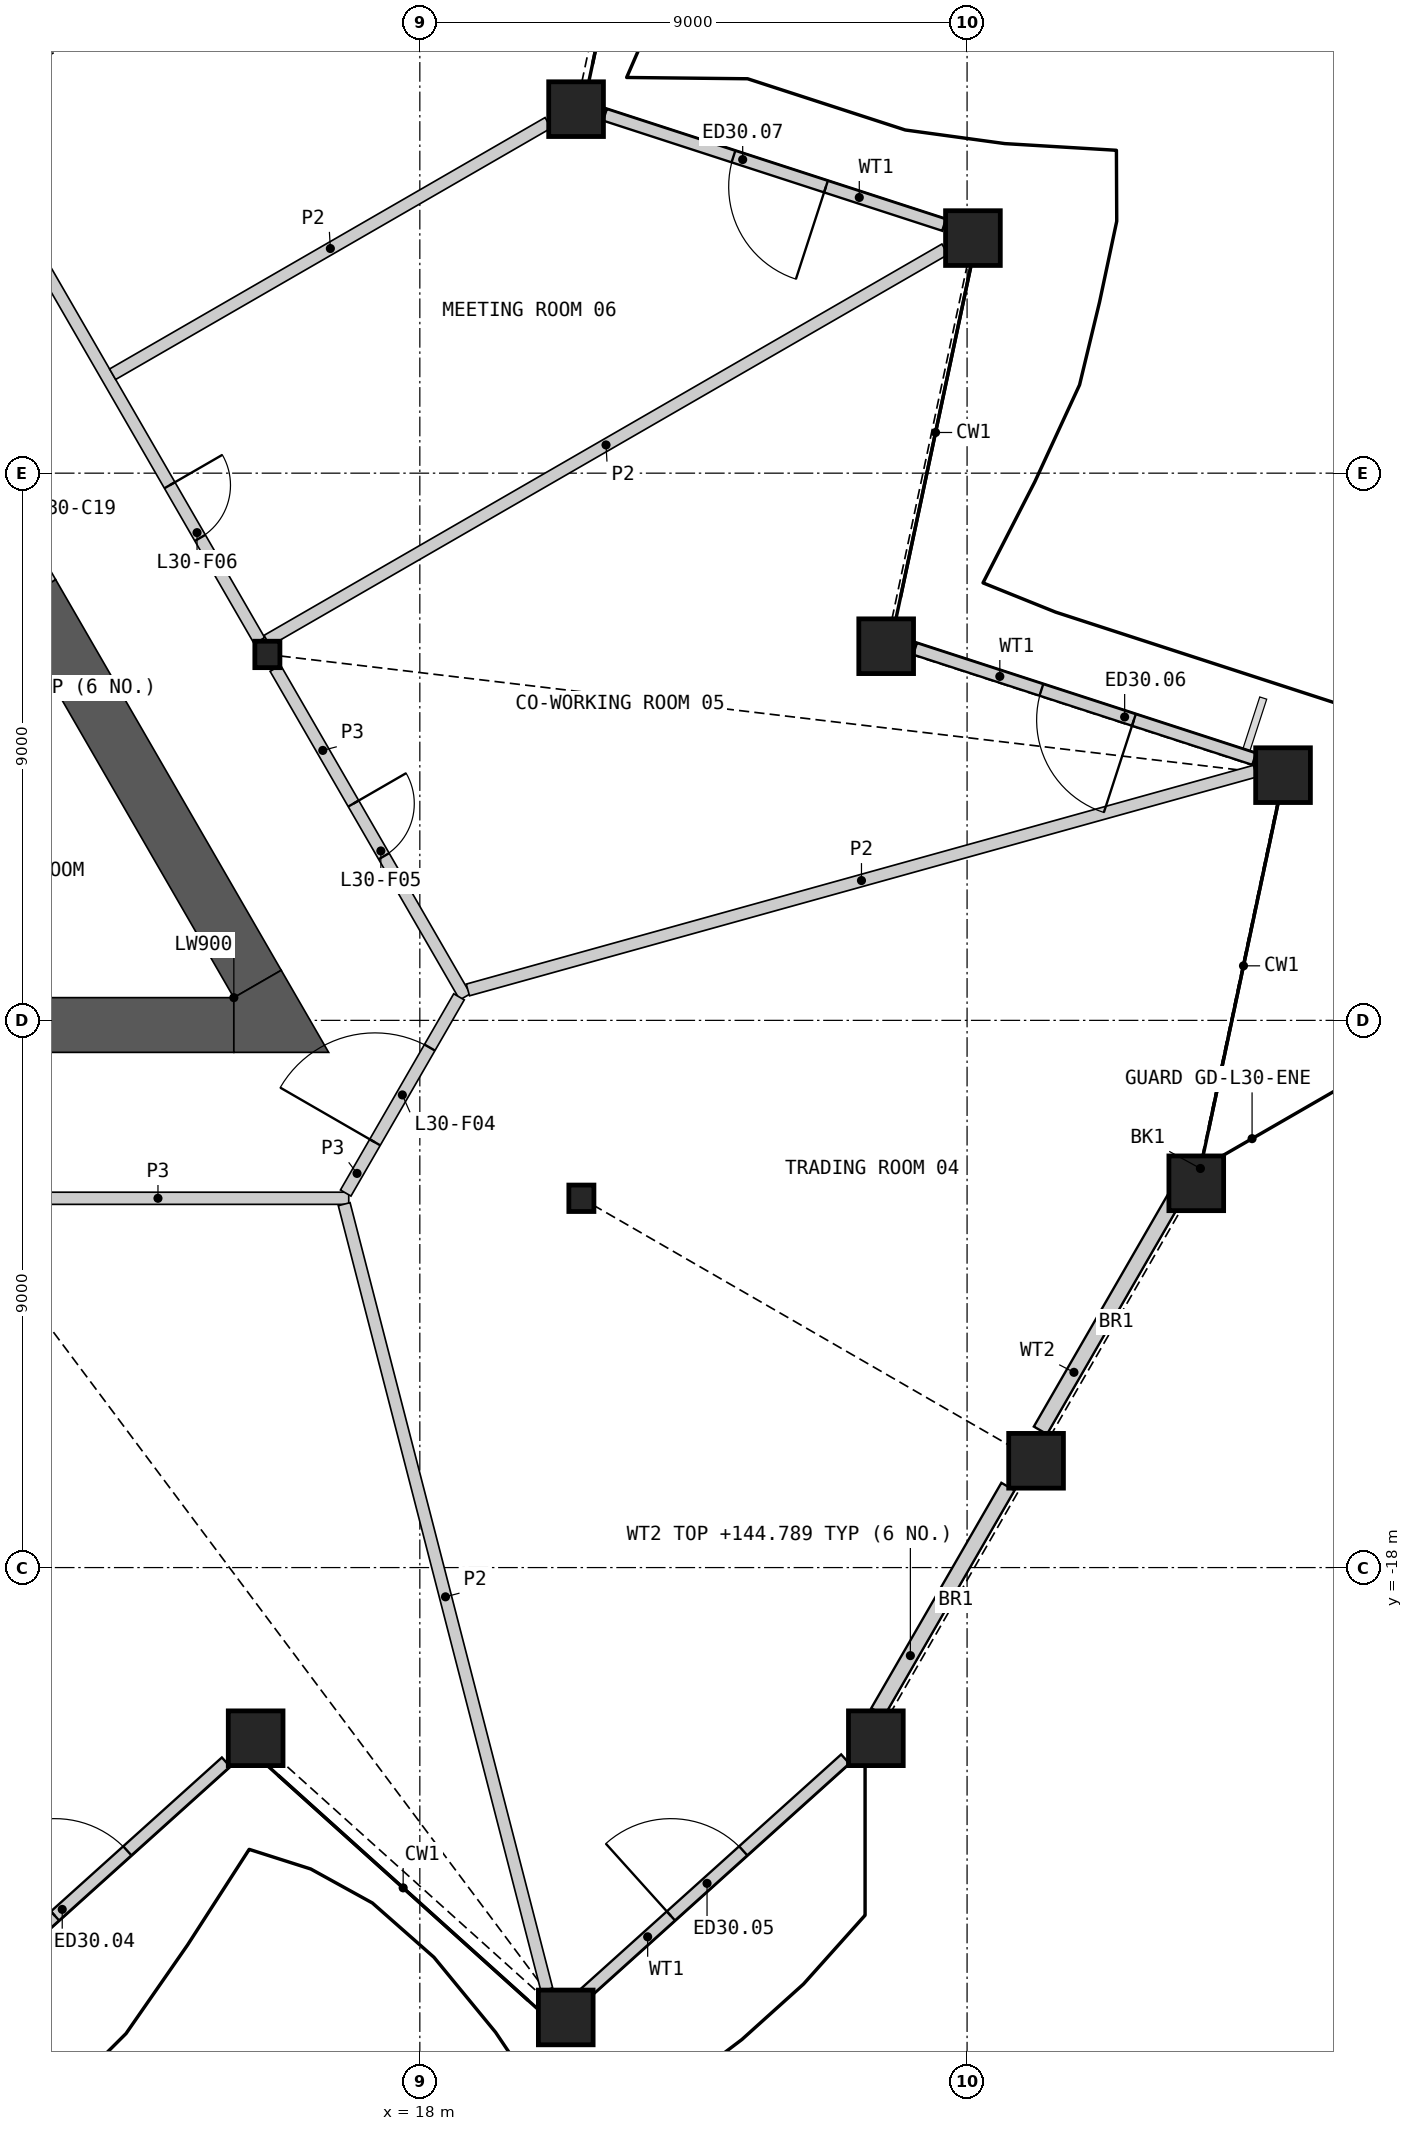
"""IFC4 building model, lengths in metres.
Left out: names, types, materials, properties, quantities, classifications, styles, units other than length and angle.
Written with IfcOpenShell. Run it as: python <this file> out.ifc"""

import sys

from ifc_helpers import new_model, si_unit, direction, frame, frame_2d, origin, origin_2d, place, context, subcontext, project, spatial, polyline, rectangle, hollow_rectangle, i_section, outline, extrude, element, fill, save


model = new_model("IFC4")
c1 = context("Model", 3, precision=1e-05, world=origin(), true_north=direction((0.0, 1.0)))
c2 = subcontext(c1, "Body", "Model", "MODEL_VIEW")
j1 = project(units=[si_unit("LENGTHUNIT", "METRE"), si_unit("PLANEANGLEUNIT", "RADIAN")], contexts=[c1])
p1 = place(None, origin())
s1 = spatial("IfcSite", under=j1, at=p1, CompositionType="ELEMENT")
p2 = place(p1, origin())
s2 = spatial("IfcBuilding", under=s1, at=p2, CompositionType="ELEMENT")
p3 = place(p2, frame((0.0, 0.0, 141.6)))
s3 = spatial("IfcBuildingStorey", under=s2, at=p3, CompositionType="ELEMENT", Elevation=141.6)
for number, where, z_axis, x_axis in (
    (1, (15.3, -20.807, 0.0), (0.0, 0.0, 1.0), (1.0, 0.0, 0.0)),
    (2, (20.4, -25.399, 0.0), (0.0, 0.0, 1.0), (1.0, 0.0, 0.0)),
    (3, (25.5, -20.807, 0.0), (0.0, 0.0, 1.0), (1.0, 0.0, 0.0)),
    (4, (28.135, -16.243, 0.0), (0.0, 0.0, 1.0), (1.0, 0.0, 0.0)),
    (5, (30.769, -11.68, 0.0), (0.0, 0.0, 1.0), (1.0, 0.0, 0.0)),
    (6, (32.196, -4.967, 0.0), (0.0, 0.0, 1.0), (1.0, 0.0, 0.0)),
    (7, (25.669, -2.846, 0.0), (0.0, 0.0, 1.0), (1.0, 0.0, 0.0)),
    (8, (27.096, 3.866, 0.0), (0.0, 0.0, 1.0), (1.0, 0.0, 0.0)),
    (9, (20.57, 5.987, 0.0), (0.0, 0.0, 1.0), (1.0, 0.0, 0.0)),
):
    element("IfcColumn", number, at=place(p3, frame(where, z_axis=z_axis, x_axis=x_axis)), inside=s3, PredefinedType="COLUMN", context=c2, shape_type="SweptSolid", body=[
        extrude(hollow_rectangle(XDim=0.9, YDim=0.9, WallThickness=0.06, at=origin_2d()), origin(), (0.0, 0.0, 1.0), 4.2),
    ])
for number, where, z_axis, x_axis in (
    (10, (20.657, -11.926, 0.0), (0.0, 0.0, 1.0), (1.0, 0.0, 0.0)),
    (11, (15.493, -2.982, 0.0), (0.0, 0.0, 1.0), (1.0, 0.0, 0.0)),
):
    element("IfcColumn", number, at=place(p3, frame(where, z_axis=z_axis, x_axis=x_axis)), inside=s3, PredefinedType="COLUMN", context=c2, shape_type="SweptSolid", body=[
        extrude(i_section(OverallWidth=0.412, OverallDepth=0.435, WebThickness=0.036, FlangeThickness=0.057, at=origin_2d()), origin(), (0.0, 0.0, 1.0), 4.2),
    ])
p4 = place(p3, frame((10.535, -25.048, 0.0), z_axis=(0.0, 0.0, 1.0), x_axis=(0.74315279225, 0.669121758256, 0.0)))
e12 = element("IfcWall", 12, at=p4, inside=s3, PredefinedType="SOLIDWALL", context=c2, shape_type="SweptSolid", body=[
    extrude(rectangle(XDim=5.755, YDim=0.2, at=frame_2d((2.877, 0.0))), origin(), (0.0, 0.0, 1.0), 3.189),
])
p5 = place(p4, frame((1.971, 0.0, 0.0)))
e13 = element("IfcOpeningElement", 13, at=p5, cuts=e12, PredefinedType="OPENING", context=c2, shape_type="SweptSolid", body=[
    extrude(rectangle(XDim=1.6, YDim=2.4, at=frame_2d((0.8, 1.2))), frame((0.0, 0.11, 0.0), z_axis=(0.0, -1.0, 0.0), x_axis=(1.0, 0.0, 0.0)), (0.0, 0.0, 1.0), 0.22),
])
p6 = place(p3, frame((20.664, -25.048, 0.0), z_axis=(0.0, 0.0, 1.0), x_axis=(0.743137948431, 0.669138244014, 0.0)))
e14 = element("IfcWall", 14, at=p6, inside=s3, PredefinedType="SOLIDWALL", context=c2, shape_type="SweptSolid", body=[
    extrude(rectangle(XDim=5.83, YDim=0.2, at=frame_2d((2.915, 0.0))), origin(), (0.0, 0.0, 1.0), 3.189),
])
p7 = place(p6, frame((1.971, 0.0, 0.0)))
e15 = element("IfcOpeningElement", 15, at=p7, cuts=e14, PredefinedType="OPENING", context=c2, shape_type="SweptSolid", body=[
    extrude(rectangle(XDim=1.6, YDim=2.4, at=frame_2d((0.8, 1.2))), frame((0.0, 0.11, 0.0), z_axis=(0.0, -1.0, 0.0), x_axis=(1.0, 0.0, 0.0)), (0.0, 0.0, 1.0), 0.22),
])
p8 = place(p3, frame((25.532, -20.375, 0.0), z_axis=(0.0, 0.0, 1.0), x_axis=(0.500010506321, 0.866019337872, 0.0)))
e16 = element("IfcWall", 16, at=p8, inside=s3, PredefinedType="SOLIDWALL", context=c2, shape_type="SweptSolid", body=[
    extrude(rectangle(XDim=4.28, YDim=0.25, at=frame_2d((2.14, 0.0))), origin(), (0.0, 0.0, 1.0), 3.189),
])
p9 = place(p3, frame((28.206, -15.743, 0.0), z_axis=(0.0, 0.0, 1.0), x_axis=(0.499979643272, 0.866037156428, 0.0)))
e17 = element("IfcWall", 17, at=p9, inside=s3, PredefinedType="SOLIDWALL", context=c2, shape_type="SweptSolid", body=[
    extrude(rectangle(XDim=4.41, YDim=0.25, at=frame_2d((2.205, 0.0))), origin(), (0.0, 0.0, 1.0), 3.189),
])
p10 = place(p3, frame((31.721, -4.702, 0.0), z_axis=(0.0, 0.0, 1.0), x_axis=(-0.951053952554, 0.309024884649, 0.0)))
e18 = element("IfcWall", 18, at=p10, inside=s3, PredefinedType="SOLIDWALL", context=c2, shape_type="SweptSolid", body=[
    extrude(rectangle(XDim=5.865, YDim=0.2, at=frame_2d((2.932, 0.0))), origin(), (0.0, 0.0, 1.0), 3.189),
])
p11 = place(p10, frame((2.08, 0.0, 0.0)))
e19 = element("IfcOpeningElement", 19, at=p11, cuts=e18, PredefinedType="OPENING", context=c2, shape_type="SweptSolid", body=[
    extrude(rectangle(XDim=1.6, YDim=2.4, at=frame_2d((0.8, 1.2))), frame((0.0, 0.11, 0.0), z_axis=(0.0, -1.0, 0.0), x_axis=(1.0, 0.0, 0.0)), (0.0, 0.0, 1.0), 0.22),
])
p12 = place(p3, frame((26.622, 4.082, 0.0), z_axis=(0.0, 0.0, 1.0), x_axis=(-0.951053952554, 0.309024884649, 0.0)))
e20 = element("IfcWall", 20, at=p12, inside=s3, PredefinedType="SOLIDWALL", context=c2, shape_type="SweptSolid", body=[
    extrude(rectangle(XDim=5.865, YDim=0.2, at=frame_2d((2.932, 0.0))), origin(), (0.0, 0.0, 1.0), 3.189),
])
p13 = place(p12, frame((2.042, 0.0, 0.0)))
e21 = element("IfcOpeningElement", 21, at=p13, cuts=e20, PredefinedType="OPENING", context=c2, shape_type="SweptSolid", body=[
    extrude(rectangle(XDim=1.6, YDim=2.4, at=frame_2d((0.8, 1.2))), frame((0.0, 0.11, 0.0), z_axis=(0.0, -1.0, 0.0), x_axis=(1.0, 0.0, 0.0)), (0.0, 0.0, 1.0), 0.22),
])
p14 = place(p3, frame((2.488, -9.076, 0.0), z_axis=(0.0, 0.0, 1.0), x_axis=(1.0, 0.0, 0.0)))
e22 = element("IfcWall", 22, at=p14, inside=s3, PredefinedType="SHEAR", context=c2, shape_type="SweptSolid", body=[
    extrude(rectangle(XDim=12.454, YDim=0.9, at=frame_2d((6.227, 0.0))), origin(), (0.0, 0.0, 1.0), 3.8),
])
p15 = place(p3, frame((15.331, -8.401, 0.0), z_axis=(0.0, 0.0, 1.0), x_axis=(-0.499985413531, 0.866033825122, 0.0)))
e23 = element("IfcWall", 23, at=p15, inside=s3, PredefinedType="SHEAR", context=c2, shape_type="SweptSolid", body=[
    extrude(rectangle(XDim=7.421, YDim=0.9, at=frame_2d((3.71, 0.0))), origin(), (0.0, 0.0, 1.0), 3.8),
])
p16 = place(p3, origin())
e24 = element("IfcWall", 24, at=p16, inside=s3, PredefinedType="SHEAR", context=c2, shape_type="SweptSolid", body=[
    extrude(outline(polyline([(14.941, -8.626), (15.721, -8.176), (16.5, -9.526), (14.941, -9.526), (14.941, -8.626)])), origin(), (0.0, 0.0, 1.0), 3.8),
])
p17 = place(p3, frame((11.621, -1.975, 0.0), z_axis=(0.0, 0.0, 1.0), x_axis=(-0.50002983664, 0.866008176907, 0.0)))
e25 = element("IfcWall", 25, at=p17, inside=s3, PredefinedType="SHEAR", context=c2, shape_type="SweptSolid", body=[
    extrude(rectangle(XDim=2.2, YDim=0.9, at=frame_2d((1.1, 0.0))), origin(), (0.0, 0.0, 1.0), 3.8),
])
p18 = place(p17, frame((0.6, 0.0, 0.0)))
e26 = element("IfcOpeningElement", 26, at=p18, cuts=e25, PredefinedType="OPENING", context=c2, shape_type="SweptSolid", body=[
    extrude(rectangle(XDim=1.0, YDim=2.1, at=frame_2d((0.5, 1.05))), frame((0.0, 0.46, 0.0), z_axis=(0.0, -1.0, 0.0), x_axis=(1.0, 0.0, 0.0)), (0.0, 0.0, 1.0), 0.92),
])
p19 = place(p3, frame((10.46, 5.736, 0.0), z_axis=(0.0, 0.0, 1.0), x_axis=(0.500004141693, -0.866023012564, 0.0)))
e27 = element("IfcWall", 27, at=p19, inside=s3, PredefinedType="PARTITIONING", context=c2, shape_type="SweptSolid", body=[
    extrude(rectangle(XDim=9.803, YDim=0.2, at=frame_2d((4.902, 0.0))), origin(), (0.0, 0.0, 1.0), 3.8),
])
p20 = place(p19, frame((6.853, 0.0, 0.0)))
e28 = element("IfcOpeningElement", 28, at=p20, cuts=e27, PredefinedType="OPENING", context=c2, shape_type="SweptSolid", body=[
    extrude(rectangle(XDim=1.0, YDim=2.1, at=frame_2d((0.5, 1.05))), frame((0.0, 0.11, 0.0), z_axis=(0.0, -1.0, 0.0), x_axis=(1.0, 0.0, 0.0)), (0.0, 0.0, 1.0), 0.22),
])
p21 = place(p3, frame((10.556, -11.926, 0.0), z_axis=(0.0, 0.0, 1.0), x_axis=(1.0, 0.0, 0.0)))
e29 = element("IfcWall", 29, at=p21, inside=s3, PredefinedType="PARTITIONING", context=c2, shape_type="SweptSolid", body=[
    extrude(rectangle(XDim=6.275, YDim=0.2, at=frame_2d((3.137, 0.0))), origin(), (0.0, 0.0, 1.0), 3.8),
])
p22 = place(p3, frame((15.624, -3.209, 0.0), z_axis=(0.0, 0.0, 1.0), x_axis=(0.499997920671, -0.866026604282, 0.0)))
e30 = element("IfcWall", 30, at=p22, inside=s3, PredefinedType="PARTITIONING", context=c2, shape_type="SweptSolid", body=[
    extrude(rectangle(XDim=6.24, YDim=0.2, at=frame_2d((3.12, 0.0))), origin(), (0.0, 0.0, 1.0), 3.8),
])
p23 = place(p22, frame((2.57, 0.0, 0.0)))
e31 = element("IfcOpeningElement", 31, at=p23, cuts=e30, PredefinedType="OPENING", context=c2, shape_type="SweptSolid", body=[
    extrude(rectangle(XDim=1.0, YDim=2.1, at=frame_2d((0.5, 1.05))), frame((0.0, 0.11, 0.0), z_axis=(0.0, -1.0, 0.0), x_axis=(1.0, 0.0, 0.0)), (0.0, 0.0, 1.0), 0.22),
])
p24 = place(p3, frame((16.781, -11.84, 0.0), z_axis=(0.0, 0.0, 1.0), x_axis=(0.499958791762, 0.866049194065, 0.0)))
e32 = element("IfcWall", 32, at=p24, inside=s3, PredefinedType="PARTITIONING", context=c2, shape_type="SweptSolid", body=[
    extrude(rectangle(XDim=3.726, YDim=0.2, at=frame_2d((1.863, 0.0))), origin(), (0.0, 0.0, 1.0), 3.8),
])
p25 = place(p24, frame((0.963, 0.0, 0.0)))
e33 = element("IfcOpeningElement", 33, at=p25, cuts=e32, PredefinedType="OPENING", context=c2, shape_type="SweptSolid", body=[
    extrude(rectangle(XDim=1.8, YDim=2.1, at=frame_2d((0.9, 1.05))), frame((0.0, 0.11, 0.0), z_axis=(0.0, -1.0, 0.0), x_axis=(1.0, 0.0, 0.0)), (0.0, 0.0, 1.0), 0.22),
])
p26 = place(p3, frame((18.79, -8.5, 0.0), z_axis=(0.0, 0.0, 1.0), x_axis=(0.963468434011, 0.267821912219, 0.0)))
e34 = element("IfcWall", 34, at=p26, inside=s3, PredefinedType="PARTITIONING", context=c2, shape_type="SweptSolid", body=[
    extrude(rectangle(XDim=13.437, YDim=0.2, at=frame_2d((6.718, 0.0))), origin(), (0.0, 0.0, 1.0), 2.885),
])
p27 = place(p3, frame((16.756, -12.023, 0.0), z_axis=(0.0, 0.0, 1.0), x_axis=(0.249815467428, -0.968293463901, 0.0)))
e35 = element("IfcWall", 35, at=p27, inside=s3, PredefinedType="PARTITIONING", context=c2, shape_type="SweptSolid", body=[
    extrude(rectangle(XDim=13.339, YDim=0.2, at=frame_2d((6.669, 0.0))), origin(), (0.0, 0.0, 1.0), 2.885),
])
p28 = place(p3, frame((15.488, -2.754, 0.0), z_axis=(0.0, 0.0, 1.0), x_axis=(0.866026411352, 0.499998254837, 0.0)))
e36 = element("IfcWall", 36, at=p28, inside=s3, PredefinedType="PARTITIONING", context=c2, shape_type="SweptSolid", body=[
    extrude(rectangle(XDim=12.873, YDim=0.2, at=frame_2d((6.437, 0.0))), origin(), (0.0, 0.0, 1.0), 2.885),
])
p29 = place(p3, frame((12.947, 1.627, 0.0), z_axis=(0.0, 0.0, 1.0), x_axis=(0.866034669089, 0.499983951678, 0.0)))
e37 = element("IfcWall", 37, at=p29, inside=s3, PredefinedType="PARTITIONING", context=c2, shape_type="SweptSolid", body=[
    extrude(rectangle(XDim=8.27, YDim=0.2, at=frame_2d((4.135, 0.0))), origin(), (0.0, 0.0, 1.0), 2.885),
])
p30 = place(p5, origin())
e38 = element("IfcDoor", 38, at=p30, inside=s3, OperationType="DOUBLE_DOOR_SINGLE_SWING", PredefinedType="DOOR", context=c2, shape_type="SweptSolid", body=[
    extrude(rectangle(XDim=1.6, YDim=2.4, at=frame_2d((0.8, 1.2))), frame((0.0, 0.025, 0.0), z_axis=(0.0, -1.0, 0.0), x_axis=(1.0, 0.0, 0.0)), (0.0, 0.0, 1.0), 0.05),
])
fill(e13, e38)
p31 = place(p7, origin())
e39 = element("IfcDoor", 39, at=p31, inside=s3, OperationType="DOUBLE_DOOR_SINGLE_SWING", PredefinedType="DOOR", context=c2, shape_type="SweptSolid", body=[
    extrude(rectangle(XDim=1.6, YDim=2.4, at=frame_2d((0.8, 1.2))), frame((0.0, 0.025, 0.0), z_axis=(0.0, -1.0, 0.0), x_axis=(1.0, 0.0, 0.0)), (0.0, 0.0, 1.0), 0.05),
])
fill(e15, e39)
p32 = place(p11, origin())
e40 = element("IfcDoor", 40, at=p32, inside=s3, OperationType="DOUBLE_DOOR_SINGLE_SWING", PredefinedType="DOOR", context=c2, shape_type="SweptSolid", body=[
    extrude(rectangle(XDim=1.6, YDim=2.4, at=frame_2d((0.8, 1.2))), frame((0.0, 0.025, 0.0), z_axis=(0.0, -1.0, 0.0), x_axis=(1.0, 0.0, 0.0)), (0.0, 0.0, 1.0), 0.05),
])
fill(e19, e40)
p33 = place(p13, origin())
e41 = element("IfcDoor", 41, at=p33, inside=s3, OperationType="DOUBLE_DOOR_SINGLE_SWING", PredefinedType="DOOR", context=c2, shape_type="SweptSolid", body=[
    extrude(rectangle(XDim=1.6, YDim=2.4, at=frame_2d((0.8, 1.2))), frame((0.0, 0.025, 0.0), z_axis=(0.0, -1.0, 0.0), x_axis=(1.0, 0.0, 0.0)), (0.0, 0.0, 1.0), 0.05),
])
fill(e21, e41)
p34 = place(p25, origin())
e42 = element("IfcDoor", 42, at=p34, inside=s3, OperationType="DOUBLE_DOOR_SINGLE_SWING", PredefinedType="DOOR", context=c2, shape_type="SweptSolid", body=[
    extrude(rectangle(XDim=1.8, YDim=2.1, at=frame_2d((0.9, 1.05))), frame((0.0, 0.025, 0.0), z_axis=(0.0, -1.0, 0.0), x_axis=(1.0, 0.0, 0.0)), (0.0, 0.0, 1.0), 0.05),
])
fill(e33, e42)
p35 = place(p23, origin())
e43 = element("IfcDoor", 43, at=p35, inside=s3, OperationType="SINGLE_SWING_LEFT", PredefinedType="DOOR", context=c2, shape_type="SweptSolid", body=[
    extrude(rectangle(XDim=1.0, YDim=2.1, at=frame_2d((0.5, 1.05))), frame((0.0, 0.025, 0.0), z_axis=(0.0, -1.0, 0.0), x_axis=(1.0, 0.0, 0.0)), (0.0, 0.0, 1.0), 0.05),
])
fill(e31, e43)
p36 = place(p20, origin())
e44 = element("IfcDoor", 44, at=p36, inside=s3, OperationType="SINGLE_SWING_LEFT", PredefinedType="DOOR", context=c2, shape_type="SweptSolid", body=[
    extrude(rectangle(XDim=1.0, YDim=2.1, at=frame_2d((0.5, 1.05))), frame((0.0, 0.025, 0.0), z_axis=(0.0, -1.0, 0.0), x_axis=(1.0, 0.0, 0.0)), (0.0, 0.0, 1.0), 0.05),
])
fill(e28, e44)
save(model, sys.argv[1])
